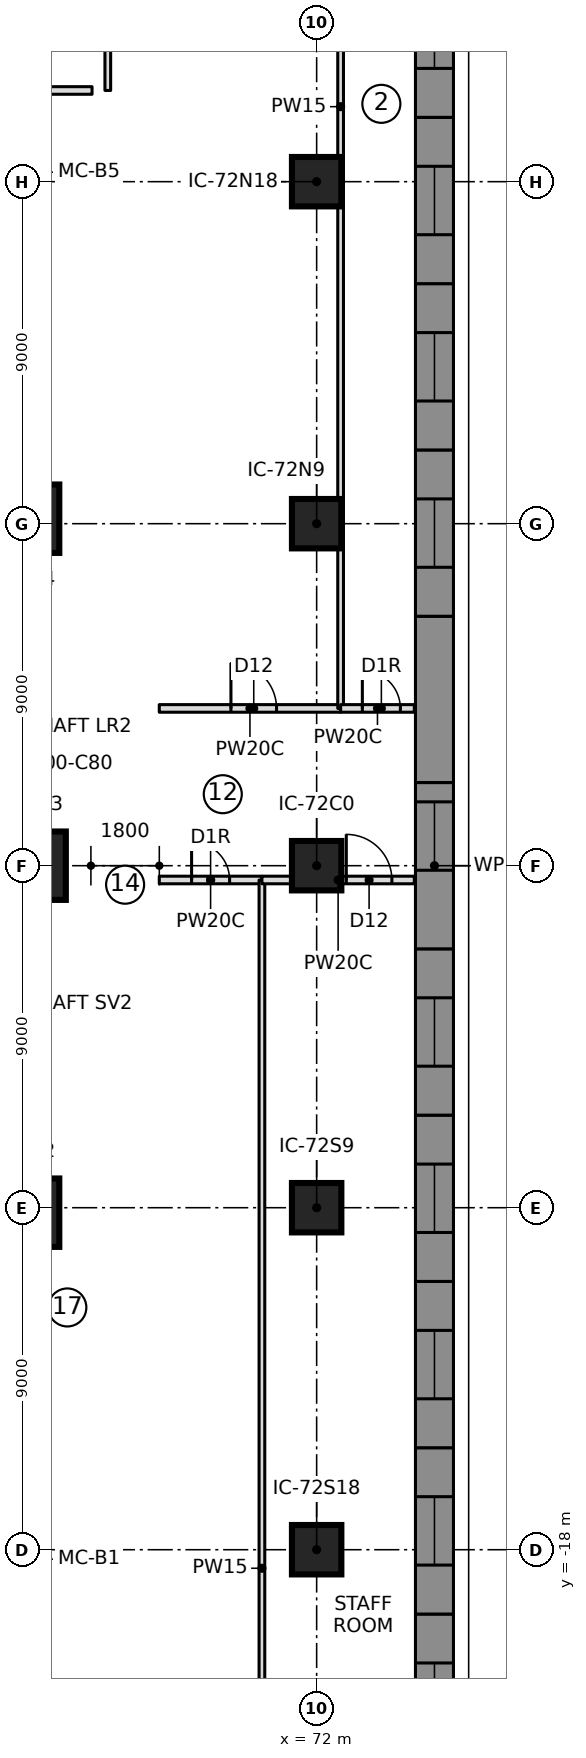
"""IFC4 building model, lengths in metres.
Left out: names, types, materials, properties, quantities, classifications, styles, units other than length and angle.
Written with IfcOpenShell. Run it as: python <this file> out.ifc"""

import sys

from ifc_helpers import new_model, si_unit, direction, frame, frame_2d, origin, origin_2d, place, context, subcontext, project, spatial, polyline, rectangle, outline, extrude, element, fill, save


model = new_model("IFC4")
c1 = context("Model", 3, precision=1e-05, world=origin(), true_north=direction((0.0, 1.0)))
c2 = subcontext(c1, "Body", "Model", "MODEL_VIEW")
j1 = project(units=[si_unit("LENGTHUNIT", "METRE"), si_unit("PLANEANGLEUNIT", "RADIAN")], contexts=[c1])
p1 = place(None, origin())
s1 = spatial("IfcSite", under=j1, at=p1, CompositionType="ELEMENT")
p2 = place(p1, origin())
s2 = spatial("IfcBuilding", under=s1, at=p2, CompositionType="ELEMENT")
p3 = place(p2, frame((0.0, 0.0, 24.0)))
s3 = spatial("IfcBuildingStorey", under=s2, at=p3, CompositionType="ELEMENT", Elevation=24.0)
for number, where, z_axis, x_axis in (
    (1, (64.328, -9.131, 0.0), (0.0, 0.0, 1.0), (1.0, 0.0, 0.0)),
    (2, (64.5, 0.0, 0.0), (0.0, 0.0, 1.0), (1.0, 0.0, 0.0)),
    (3, (64.328, 9.131, 0.0), (0.0, 0.0, 1.0), (1.0, 0.0, 0.0)),
):
    element("IfcColumn", number, at=place(p3, frame(where, z_axis=z_axis, x_axis=x_axis)), inside=s3, PredefinedType="COLUMN", context=c2, shape_type="SweptSolid", body=[
        extrude(rectangle(XDim=1.8, YDim=1.8, at=origin_2d()), origin(), (0.0, 0.0, 1.0), 5.0),
    ])
for number, where, z_axis, x_axis in (
    (4, (72.0, -18.0, 0.0), (0.0, 0.0, 1.0), (1.0, 0.0, 0.0)),
    (5, (72.0, -9.0, 0.0), (0.0, 0.0, 1.0), (1.0, 0.0, 0.0)),
    (6, (72.0, 0.0, 0.0), (0.0, 0.0, 1.0), (1.0, 0.0, 0.0)),
    (7, (72.0, 9.0, 0.0), (0.0, 0.0, 1.0), (1.0, 0.0, 0.0)),
    (8, (72.0, 18.0, 0.0), (0.0, 0.0, 1.0), (1.0, 0.0, 0.0)),
):
    element("IfcColumn", number, at=place(p3, frame(where, z_axis=z_axis, x_axis=x_axis)), inside=s3, PredefinedType="COLUMN", context=c2, shape_type="SweptSolid", body=[
        extrude(rectangle(XDim=1.3, YDim=1.3, at=origin_2d()), origin(), (0.0, 0.0, 1.0), 4.65),
    ])
p4 = place(p3, frame((75.1, -24.069, 0.0), z_axis=(0.0, 0.0, 1.0), x_axis=(0.0, 1.0, 0.0)))
e9 = element("IfcWall", 9, at=p4, inside=s3, PredefinedType="NOTDEFINED", context=c2, shape_type="SweptSolid", body=[
    extrude(outline(polyline([(0.0, -0.5), (4.376, -0.5), (4.376, 0.5), (0.0, 0.5), (0.0, -0.5)])), origin(), (0.0, 0.0, 1.0), 4.7),
])
p5 = place(p4, frame((1.288, 0.0, 0.9)))
e10 = element("IfcOpeningElement", 10, at=p5, cuts=e9, PredefinedType="OPENING", context=c2, shape_type="SweptSolid", body=[
    extrude(rectangle(XDim=1.8, YDim=2.4, at=frame_2d((0.9, 1.2))), frame((0.0, 0.51, 0.0), z_axis=(0.0, -1.0, 0.0), x_axis=(1.0, 0.0, 0.0)), (0.0, 0.0, 1.0), 1.02),
])
p6 = place(p3, frame((75.1, -19.693, 0.0), z_axis=(0.0, 0.0, 1.0), x_axis=(0.0, 1.0, 0.0)))
e11 = element("IfcWall", 11, at=p6, inside=s3, PredefinedType="NOTDEFINED", context=c2, shape_type="SweptSolid", body=[
    extrude(outline(polyline([(0.0, -0.5), (4.376, -0.5), (4.376, 0.5), (0.0, 0.5), (0.0, -0.5)])), origin(), (0.0, 0.0, 1.0), 4.7),
])
p7 = place(p6, frame((1.288, 0.0, 0.9)))
e12 = element("IfcOpeningElement", 12, at=p7, cuts=e11, PredefinedType="OPENING", context=c2, shape_type="SweptSolid", body=[
    extrude(rectangle(XDim=1.8, YDim=2.4, at=frame_2d((0.9, 1.2))), frame((0.0, 0.51, 0.0), z_axis=(0.0, -1.0, 0.0), x_axis=(1.0, 0.0, 0.0)), (0.0, 0.0, 1.0), 1.02),
])
p8 = place(p3, frame((75.1, -15.316, 0.0), z_axis=(0.0, 0.0, 1.0), x_axis=(0.0, 1.0, 0.0)))
e13 = element("IfcWall", 13, at=p8, inside=s3, PredefinedType="NOTDEFINED", context=c2, shape_type="SweptSolid", body=[
    extrude(outline(polyline([(0.0, -0.5), (4.376, -0.5), (4.376, 0.5), (0.0, 0.5), (0.0, -0.5)])), origin(), (0.0, 0.0, 1.0), 4.7),
])
p9 = place(p8, frame((1.288, 0.0, 0.9)))
e14 = element("IfcOpeningElement", 14, at=p9, cuts=e13, PredefinedType="OPENING", context=c2, shape_type="SweptSolid", body=[
    extrude(rectangle(XDim=1.8, YDim=2.4, at=frame_2d((0.9, 1.2))), frame((0.0, 0.51, 0.0), z_axis=(0.0, -1.0, 0.0), x_axis=(1.0, 0.0, 0.0)), (0.0, 0.0, 1.0), 1.02),
])
p10 = place(p3, frame((75.1, -10.94, 0.0), z_axis=(0.0, 0.0, 1.0), x_axis=(0.0, 1.0, 0.0)))
e15 = element("IfcWall", 15, at=p10, inside=s3, PredefinedType="NOTDEFINED", context=c2, shape_type="SweptSolid", body=[
    extrude(outline(polyline([(0.0, -0.5), (4.376, -0.5), (4.376, 0.5), (0.0, 0.5), (0.0, -0.5)])), origin(), (0.0, 0.0, 1.0), 4.7),
])
p11 = place(p10, frame((1.288, 0.0, 0.9)))
e16 = element("IfcOpeningElement", 16, at=p11, cuts=e15, PredefinedType="OPENING", context=c2, shape_type="SweptSolid", body=[
    extrude(rectangle(XDim=1.8, YDim=2.4, at=frame_2d((0.9, 1.2))), frame((0.0, 0.51, 0.0), z_axis=(0.0, -1.0, 0.0), x_axis=(1.0, 0.0, 0.0)), (0.0, 0.0, 1.0), 1.02),
])
p12 = place(p3, frame((75.1, -6.564, 0.0), z_axis=(0.0, 0.0, 1.0), x_axis=(0.0, 1.0, 0.0)))
e17 = element("IfcWall", 17, at=p12, inside=s3, PredefinedType="NOTDEFINED", context=c2, shape_type="SweptSolid", body=[
    extrude(outline(polyline([(0.0, -0.5), (4.376, -0.5), (4.376, 0.5), (0.0, 0.5), (0.0, -0.5)])), origin(), (0.0, 0.0, 1.0), 4.7),
])
p13 = place(p12, frame((1.288, 0.0, 0.9)))
e18 = element("IfcOpeningElement", 18, at=p13, cuts=e17, PredefinedType="OPENING", context=c2, shape_type="SweptSolid", body=[
    extrude(rectangle(XDim=1.8, YDim=2.4, at=frame_2d((0.9, 1.2))), frame((0.0, 0.51, 0.0), z_axis=(0.0, -1.0, 0.0), x_axis=(1.0, 0.0, 0.0)), (0.0, 0.0, 1.0), 1.02),
])
p14 = place(p3, frame((75.1, -2.188, 0.0), z_axis=(0.0, 0.0, 1.0), x_axis=(0.0, 1.0, 0.0)))
e19 = element("IfcWall", 19, at=p14, inside=s3, PredefinedType="NOTDEFINED", context=c2, shape_type="SweptSolid", body=[
    extrude(outline(polyline([(0.0, -0.5), (4.376, -0.5), (4.376, 0.5), (0.0, 0.5), (0.0, -0.5)])), origin(), (0.0, 0.0, 1.0), 4.7),
])
p15 = place(p14, frame((2.068, 0.0, 0.9)))
e20 = element("IfcOpeningElement", 20, at=p15, cuts=e19, PredefinedType="OPENING", context=c2, shape_type="SweptSolid", body=[
    extrude(rectangle(XDim=1.8, YDim=2.4, at=frame_2d((0.9, 1.2))), frame((0.0, 0.51, 0.0), z_axis=(0.0, -1.0, 0.0), x_axis=(1.0, 0.0, 0.0)), (0.0, 0.0, 1.0), 1.02),
])
p16 = place(p3, frame((75.1, 2.188, 0.0), z_axis=(0.0, 0.0, 1.0), x_axis=(0.0, 1.0, 0.0)))
e21 = element("IfcWall", 21, at=p16, inside=s3, PredefinedType="NOTDEFINED", context=c2, shape_type="SweptSolid", body=[
    extrude(outline(polyline([(0.0, -0.5), (4.376, -0.5), (4.376, 0.5), (0.0, 0.5), (0.0, -0.5)])), origin(), (0.0, 0.0, 1.0), 4.7),
])
p17 = place(p3, frame((75.1, 6.564, 0.0), z_axis=(0.0, 0.0, 1.0), x_axis=(0.0, 1.0, 0.0)))
e22 = element("IfcWall", 22, at=p17, inside=s3, PredefinedType="NOTDEFINED", context=c2, shape_type="SweptSolid", body=[
    extrude(outline(polyline([(0.0, -0.5), (4.376, -0.5), (4.376, 0.5), (0.0, 0.5), (0.0, -0.5)])), origin(), (0.0, 0.0, 1.0), 4.7),
])
p18 = place(p17, frame((1.288, 0.0, 0.9)))
e23 = element("IfcOpeningElement", 23, at=p18, cuts=e22, PredefinedType="OPENING", context=c2, shape_type="SweptSolid", body=[
    extrude(rectangle(XDim=1.8, YDim=2.4, at=frame_2d((0.9, 1.2))), frame((0.0, 0.51, 0.0), z_axis=(0.0, -1.0, 0.0), x_axis=(1.0, 0.0, 0.0)), (0.0, 0.0, 1.0), 1.02),
])
p19 = place(p3, frame((75.1, 10.94, 0.0), z_axis=(0.0, 0.0, 1.0), x_axis=(0.0, 1.0, 0.0)))
e24 = element("IfcWall", 24, at=p19, inside=s3, PredefinedType="NOTDEFINED", context=c2, shape_type="SweptSolid", body=[
    extrude(outline(polyline([(0.0, -0.5), (4.376, -0.5), (4.376, 0.5), (0.0, 0.5), (0.0, -0.5)])), origin(), (0.0, 0.0, 1.0), 4.7),
])
p20 = place(p19, frame((1.288, 0.0, 0.9)))
e25 = element("IfcOpeningElement", 25, at=p20, cuts=e24, PredefinedType="OPENING", context=c2, shape_type="SweptSolid", body=[
    extrude(rectangle(XDim=1.8, YDim=2.4, at=frame_2d((0.9, 1.2))), frame((0.0, 0.51, 0.0), z_axis=(0.0, -1.0, 0.0), x_axis=(1.0, 0.0, 0.0)), (0.0, 0.0, 1.0), 1.02),
])
p21 = place(p3, frame((75.1, 15.316, 0.0), z_axis=(0.0, 0.0, 1.0), x_axis=(0.0, 1.0, 0.0)))
e26 = element("IfcWall", 26, at=p21, inside=s3, PredefinedType="NOTDEFINED", context=c2, shape_type="SweptSolid", body=[
    extrude(outline(polyline([(0.0, -0.5), (4.376, -0.5), (4.376, 0.5), (0.0, 0.5), (0.0, -0.5)])), origin(), (0.0, 0.0, 1.0), 4.7),
])
p22 = place(p21, frame((1.288, 0.0, 0.9)))
e27 = element("IfcOpeningElement", 27, at=p22, cuts=e26, PredefinedType="OPENING", context=c2, shape_type="SweptSolid", body=[
    extrude(rectangle(XDim=1.8, YDim=2.4, at=frame_2d((0.9, 1.2))), frame((0.0, 0.51, 0.0), z_axis=(0.0, -1.0, 0.0), x_axis=(1.0, 0.0, 0.0)), (0.0, 0.0, 1.0), 1.02),
])
p23 = place(p3, frame((75.1, 19.693, 0.0), z_axis=(0.0, 0.0, 1.0), x_axis=(0.0, 1.0, 0.0)))
e28 = element("IfcWall", 28, at=p23, inside=s3, PredefinedType="NOTDEFINED", context=c2, shape_type="SweptSolid", body=[
    extrude(outline(polyline([(0.0, -0.5), (4.376, -0.5), (4.376, 0.5), (0.0, 0.5), (0.0, -0.5)])), origin(), (0.0, 0.0, 1.0), 4.7),
])
p24 = place(p23, frame((1.288, 0.0, 0.9)))
e29 = element("IfcOpeningElement", 29, at=p24, cuts=e28, PredefinedType="OPENING", context=c2, shape_type="SweptSolid", body=[
    extrude(rectangle(XDim=1.8, YDim=2.4, at=frame_2d((0.9, 1.2))), frame((0.0, 0.51, 0.0), z_axis=(0.0, -1.0, 0.0), x_axis=(1.0, 0.0, 0.0)), (0.0, 0.0, 1.0), 1.02),
])
p25 = place(p3, frame((67.859, -0.376, 0.0), z_axis=(0.0, 0.0, 1.0), x_axis=(1.0, 0.0, 0.0)))
e30 = element("IfcWall", 30, at=p25, inside=s3, PredefinedType="PARTITIONING", context=c2, shape_type="SweptSolid", body=[
    extrude(rectangle(XDim=2.701, YDim=0.2, at=frame_2d((1.351, 0.0))), origin(), (0.0, 0.0, 1.0), 4.55),
])
p26 = place(p25, frame((0.851, 0.0, 0.0)))
e31 = element("IfcOpeningElement", 31, at=p26, cuts=e30, PredefinedType="OPENING", context=c2, shape_type="SweptSolid", body=[
    extrude(rectangle(XDim=1.0, YDim=2.1, at=frame_2d((0.5, 1.05))), frame((0.0, 0.11, 0.0), z_axis=(0.0, -1.0, 0.0), x_axis=(1.0, 0.0, 0.0)), (0.0, 0.0, 1.0), 0.22),
])
p27 = place(p3, frame((70.56, -36.6, 0.0), z_axis=(0.0, 0.0, 1.0), x_axis=(0.0, 1.0, 0.0)))
e32 = element("IfcWall", 32, at=p27, inside=s3, PredefinedType="PARTITIONING", context=c2, shape_type="SweptSolid", body=[
    extrude(rectangle(XDim=36.224, YDim=0.15, at=frame_2d((18.112, 0.0))), origin(), (0.0, 0.0, 1.0), 4.55),
])
p28 = place(p3, frame((70.56, -0.376, 0.0), z_axis=(0.0, 0.0, 1.0), x_axis=(1.0, 0.0, 0.0)))
e33 = element("IfcWall", 33, at=p28, inside=s3, PredefinedType="PARTITIONING", context=c2, shape_type="SweptSolid", body=[
    extrude(rectangle(XDim=4.01, YDim=0.2, at=frame_2d((2.005, 0.0))), origin(), (0.0, 0.0, 1.0), 4.55),
])
p29 = place(p28, frame((2.22, 0.0, 0.0)))
e34 = element("IfcOpeningElement", 34, at=p29, cuts=e33, PredefinedType="OPENING", context=c2, shape_type="SweptSolid", body=[
    extrude(rectangle(XDim=1.2, YDim=2.1, at=frame_2d((0.6, 1.05))), frame((0.0, 0.11, 0.0), z_axis=(0.0, -1.0, 0.0), x_axis=(1.0, 0.0, 0.0)), (0.0, 0.0, 1.0), 0.22),
])
p30 = place(p3, frame((66.504, 20.4, 0.0), z_axis=(0.0, 0.0, 1.0), x_axis=(0.0, 1.0, 0.0)))
e35 = element("IfcWall", 35, at=p30, inside=s3, PredefinedType="PARTITIONING", context=c2, shape_type="SweptSolid", body=[
    extrude(rectangle(XDim=16.2, YDim=0.15, at=frame_2d((8.1, 0.0))), origin(), (0.0, 0.0, 1.0), 4.55),
])
p31 = place(p3, frame((67.859, 4.139, 0.0), z_axis=(0.0, 0.0, 1.0), x_axis=(1.0, 0.0, 0.0)))
e36 = element("IfcWall", 36, at=p31, inside=s3, PredefinedType="PARTITIONING", context=c2, shape_type="SweptSolid", body=[
    extrude(rectangle(XDim=4.772, YDim=0.2, at=frame_2d((2.386, 0.0))), origin(), (0.0, 0.0, 1.0), 4.55),
])
p32 = place(p31, frame((1.886, 0.0, 0.0)))
e37 = element("IfcOpeningElement", 37, at=p32, cuts=e36, PredefinedType="OPENING", context=c2, shape_type="SweptSolid", body=[
    extrude(rectangle(XDim=1.2, YDim=2.1, at=frame_2d((0.6, 1.05))), frame((0.0, 0.11, 0.0), z_axis=(0.0, -1.0, 0.0), x_axis=(1.0, 0.0, 0.0)), (0.0, 0.0, 1.0), 0.22),
])
p33 = place(p3, frame((72.631, 4.139, 0.0), z_axis=(0.0, 0.0, 1.0), x_axis=(0.0, 1.0, 0.0)))
e38 = element("IfcWall", 38, at=p33, inside=s3, PredefinedType="PARTITIONING", context=c2, shape_type="SweptSolid", body=[
    extrude(rectangle(XDim=31.67, YDim=0.15, at=frame_2d((15.835, 0.0))), origin(), (0.0, 0.0, 1.0), 4.55),
])
p34 = place(p3, frame((72.631, 4.139, 0.0), z_axis=(0.0, 0.0, 1.0), x_axis=(1.0, 0.0, 0.0)))
e39 = element("IfcWall", 39, at=p34, inside=s3, PredefinedType="PARTITIONING", context=c2, shape_type="SweptSolid", body=[
    extrude(rectangle(XDim=1.939, YDim=0.2, at=frame_2d((0.97, 0.0))), origin(), (0.0, 0.0, 1.0), 4.55),
])
p35 = place(p34, frame((0.572, 0.0, 0.0)))
e40 = element("IfcOpeningElement", 40, at=p35, cuts=e39, PredefinedType="OPENING", context=c2, shape_type="SweptSolid", body=[
    extrude(rectangle(XDim=1.0, YDim=2.1, at=frame_2d((0.5, 1.05))), frame((0.0, 0.11, 0.0), z_axis=(0.0, -1.0, 0.0), x_axis=(1.0, 0.0, 0.0)), (0.0, 0.0, 1.0), 0.22),
])
p36 = place(p3, frame((66.09, 20.4, 0.0), z_axis=(0.0, 0.0, 1.0), x_axis=(-1.0, 0.0, 0.0)))
e41 = element("IfcWall", 41, at=p36, inside=s3, PredefinedType="PARTITIONING", context=c2, shape_type="SweptSolid", body=[
    extrude(rectangle(XDim=5.712, YDim=0.2, at=frame_2d((2.856, 0.0))), origin(), (0.0, 0.0, 1.0), 4.55),
])
p37 = place(p36, frame((3.05, 0.0, 0.0)))
e42 = element("IfcOpeningElement", 42, at=p37, cuts=e41, PredefinedType="OPENING", context=c2, shape_type="SweptSolid", body=[
    extrude(rectangle(XDim=1.0, YDim=2.1, at=frame_2d((0.5, 1.05))), frame((0.0, 0.11, 0.0), z_axis=(0.0, -1.0, 0.0), x_axis=(1.0, 0.0, 0.0)), (0.0, 0.0, 1.0), 0.22),
])
p38 = place(p5, origin())
e43 = element("IfcWindow", 43, at=p38, inside=s3, PartitioningType="SINGLE_PANEL", PredefinedType="WINDOW", context=c2, shape_type="SweptSolid", body=[
    extrude(rectangle(XDim=1.8, YDim=2.4, at=frame_2d((0.9, 1.2))), frame((0.0, 0.5, 0.0), z_axis=(0.0, -1.0, 0.0), x_axis=(1.0, 0.0, 0.0)), (0.0, 0.0, 1.0), 0.06),
])
fill(e10, e43)
p39 = place(p7, origin())
e44 = element("IfcWindow", 44, at=p39, inside=s3, PartitioningType="SINGLE_PANEL", PredefinedType="WINDOW", context=c2, shape_type="SweptSolid", body=[
    extrude(rectangle(XDim=1.8, YDim=2.4, at=frame_2d((0.9, 1.2))), frame((0.0, 0.5, 0.0), z_axis=(0.0, -1.0, 0.0), x_axis=(1.0, 0.0, 0.0)), (0.0, 0.0, 1.0), 0.06),
])
fill(e12, e44)
p40 = place(p9, origin())
e45 = element("IfcWindow", 45, at=p40, inside=s3, PartitioningType="SINGLE_PANEL", PredefinedType="WINDOW", context=c2, shape_type="SweptSolid", body=[
    extrude(rectangle(XDim=1.8, YDim=2.4, at=frame_2d((0.9, 1.2))), frame((0.0, 0.5, 0.0), z_axis=(0.0, -1.0, 0.0), x_axis=(1.0, 0.0, 0.0)), (0.0, 0.0, 1.0), 0.06),
])
fill(e14, e45)
p41 = place(p11, origin())
e46 = element("IfcWindow", 46, at=p41, inside=s3, PartitioningType="SINGLE_PANEL", PredefinedType="WINDOW", context=c2, shape_type="SweptSolid", body=[
    extrude(rectangle(XDim=1.8, YDim=2.4, at=frame_2d((0.9, 1.2))), frame((0.0, 0.5, 0.0), z_axis=(0.0, -1.0, 0.0), x_axis=(1.0, 0.0, 0.0)), (0.0, 0.0, 1.0), 0.06),
])
fill(e16, e46)
p42 = place(p13, origin())
e47 = element("IfcWindow", 47, at=p42, inside=s3, PartitioningType="SINGLE_PANEL", PredefinedType="WINDOW", context=c2, shape_type="SweptSolid", body=[
    extrude(rectangle(XDim=1.8, YDim=2.4, at=frame_2d((0.9, 1.2))), frame((0.0, 0.5, 0.0), z_axis=(0.0, -1.0, 0.0), x_axis=(1.0, 0.0, 0.0)), (0.0, 0.0, 1.0), 0.06),
])
fill(e18, e47)
p43 = place(p15, origin())
e48 = element("IfcWindow", 48, at=p43, inside=s3, PartitioningType="SINGLE_PANEL", PredefinedType="WINDOW", context=c2, shape_type="SweptSolid", body=[
    extrude(rectangle(XDim=1.8, YDim=2.4, at=frame_2d((0.9, 1.2))), frame((0.0, 0.5, 0.0), z_axis=(0.0, -1.0, 0.0), x_axis=(1.0, 0.0, 0.0)), (0.0, 0.0, 1.0), 0.06),
])
fill(e20, e48)
p44 = place(p18, origin())
e49 = element("IfcWindow", 49, at=p44, inside=s3, PartitioningType="SINGLE_PANEL", PredefinedType="WINDOW", context=c2, shape_type="SweptSolid", body=[
    extrude(rectangle(XDim=1.8, YDim=2.4, at=frame_2d((0.9, 1.2))), frame((0.0, 0.5, 0.0), z_axis=(0.0, -1.0, 0.0), x_axis=(1.0, 0.0, 0.0)), (0.0, 0.0, 1.0), 0.06),
])
fill(e23, e49)
p45 = place(p20, origin())
e50 = element("IfcWindow", 50, at=p45, inside=s3, PartitioningType="SINGLE_PANEL", PredefinedType="WINDOW", context=c2, shape_type="SweptSolid", body=[
    extrude(rectangle(XDim=1.8, YDim=2.4, at=frame_2d((0.9, 1.2))), frame((0.0, 0.5, 0.0), z_axis=(0.0, -1.0, 0.0), x_axis=(1.0, 0.0, 0.0)), (0.0, 0.0, 1.0), 0.06),
])
fill(e25, e50)
p46 = place(p22, origin())
e51 = element("IfcWindow", 51, at=p46, inside=s3, PartitioningType="SINGLE_PANEL", PredefinedType="WINDOW", context=c2, shape_type="SweptSolid", body=[
    extrude(rectangle(XDim=1.8, YDim=2.4, at=frame_2d((0.9, 1.2))), frame((0.0, 0.5, 0.0), z_axis=(0.0, -1.0, 0.0), x_axis=(1.0, 0.0, 0.0)), (0.0, 0.0, 1.0), 0.06),
])
fill(e27, e51)
p47 = place(p24, origin())
e52 = element("IfcWindow", 52, at=p47, inside=s3, PartitioningType="SINGLE_PANEL", PredefinedType="WINDOW", context=c2, shape_type="SweptSolid", body=[
    extrude(rectangle(XDim=1.8, YDim=2.4, at=frame_2d((0.9, 1.2))), frame((0.0, 0.5, 0.0), z_axis=(0.0, -1.0, 0.0), x_axis=(1.0, 0.0, 0.0)), (0.0, 0.0, 1.0), 0.06),
])
fill(e29, e52)
p48 = place(p26, origin())
e53 = element("IfcDoor", 53, at=p48, inside=s3, OperationType="SINGLE_SWING_RIGHT", PredefinedType="DOOR", context=c2, shape_type="SweptSolid", body=[
    extrude(rectangle(XDim=1.0, YDim=2.1, at=frame_2d((0.5, 1.05))), frame((0.0, 0.025, 0.0), z_axis=(0.0, -1.0, 0.0), x_axis=(1.0, 0.0, 0.0)), (0.0, 0.0, 1.0), 0.05),
])
fill(e31, e53)
p49 = place(p29, origin())
e54 = element("IfcDoor", 54, at=p49, inside=s3, OperationType="SINGLE_SWING_RIGHT", PredefinedType="DOOR", context=c2, shape_type="SweptSolid", body=[
    extrude(rectangle(XDim=1.2, YDim=2.1, at=frame_2d((0.6, 1.05))), frame((0.0, 0.025, 0.0), z_axis=(0.0, -1.0, 0.0), x_axis=(1.0, 0.0, 0.0)), (0.0, 0.0, 1.0), 0.05),
])
fill(e34, e54)
p50 = place(p32, origin())
e55 = element("IfcDoor", 55, at=p50, inside=s3, OperationType="SINGLE_SWING_RIGHT", PredefinedType="DOOR", context=c2, shape_type="SweptSolid", body=[
    extrude(rectangle(XDim=1.2, YDim=2.1, at=frame_2d((0.6, 1.05))), frame((0.0, 0.025, 0.0), z_axis=(0.0, -1.0, 0.0), x_axis=(1.0, 0.0, 0.0)), (0.0, 0.0, 1.0), 0.05),
])
fill(e37, e55)
p51 = place(p35, origin())
e56 = element("IfcDoor", 56, at=p51, inside=s3, OperationType="SINGLE_SWING_RIGHT", PredefinedType="DOOR", context=c2, shape_type="SweptSolid", body=[
    extrude(rectangle(XDim=1.0, YDim=2.1, at=frame_2d((0.5, 1.05))), frame((0.0, 0.025, 0.0), z_axis=(0.0, -1.0, 0.0), x_axis=(1.0, 0.0, 0.0)), (0.0, 0.0, 1.0), 0.05),
])
fill(e40, e56)
save(model, sys.argv[1])
